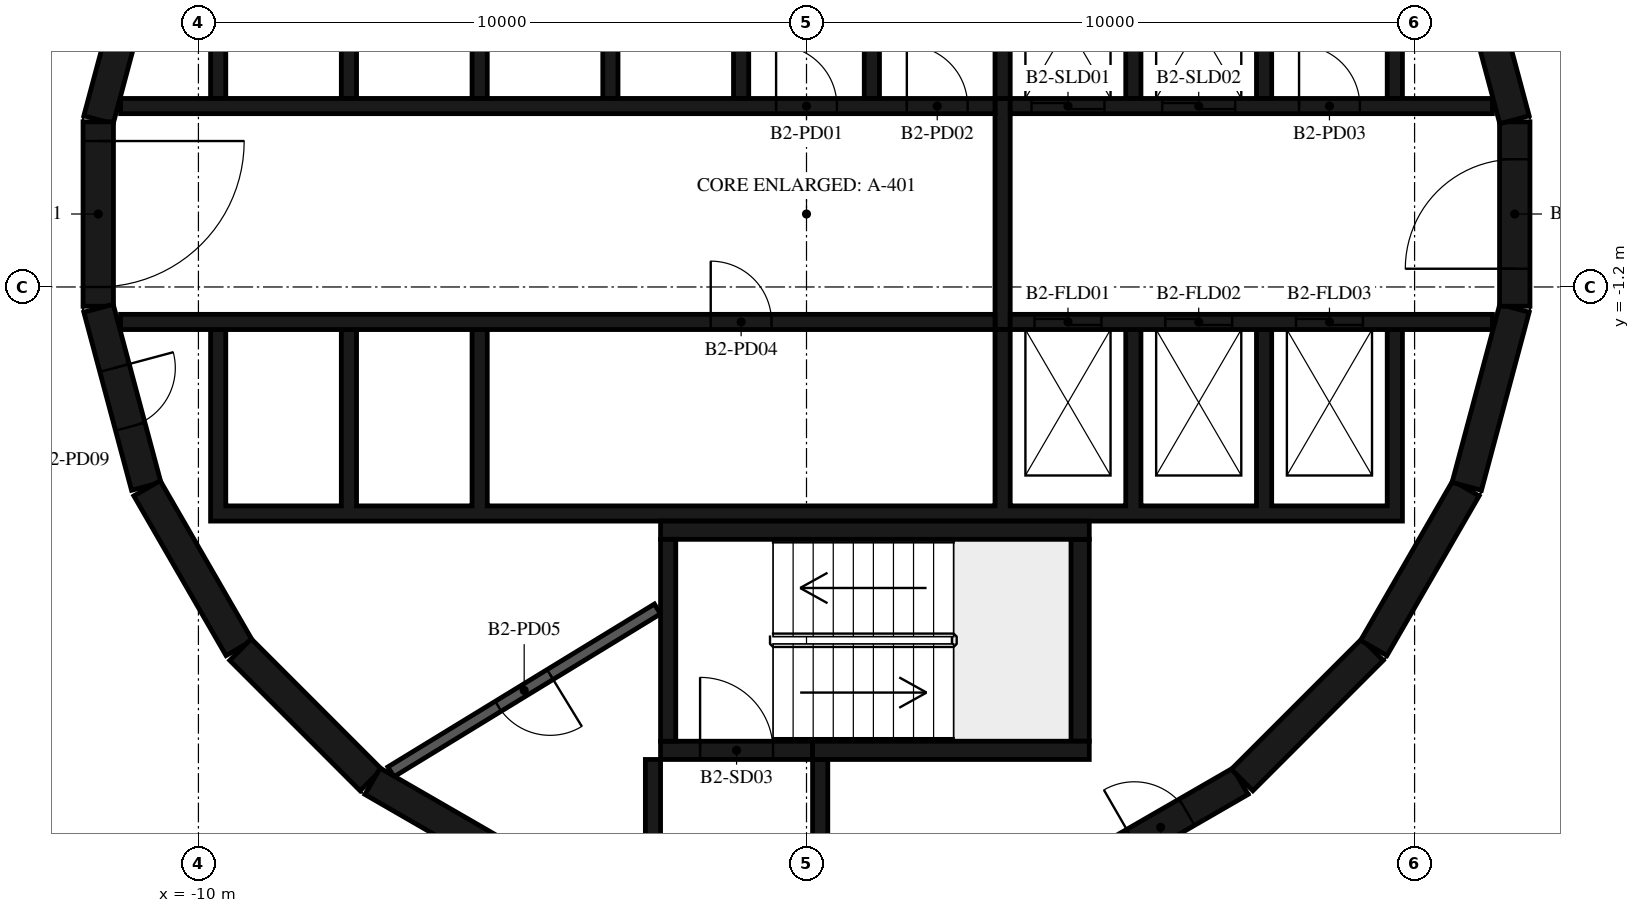
"""IFC4 building model, lengths in metres.
Left out: names, types, materials, properties, quantities, classifications, styles, units other than length and angle.
Written with IfcOpenShell. Run it as: python <this file> out.ifc"""

import sys

from ifc_helpers import new_model, si_unit, direction, frame, frame_2d, origin, place, context, subcontext, project, spatial, polyline, rectangle, outline, extrude, element, fill, save


model = new_model("IFC4")
c1 = context("Model", 3, precision=1e-05, world=origin(), true_north=direction((0.0, 1.0)))
c2 = subcontext(c1, "Body", "Model", "MODEL_VIEW")
j1 = project(units=[si_unit("LENGTHUNIT", "METRE"), si_unit("PLANEANGLEUNIT", "RADIAN")], contexts=[c1])
p1 = place(None, origin())
s1 = spatial("IfcSite", under=j1, at=p1, CompositionType="ELEMENT")
p2 = place(p1, origin())
s2 = spatial("IfcBuilding", under=s1, at=p2, CompositionType="ELEMENT")
p3 = place(p2, frame((0.0, 0.0, -8.4)))
s3 = spatial("IfcBuildingStorey", under=s2, at=p3, CompositionType="ELEMENT", Elevation=-8.4)
p4 = place(p3, frame((4.51, -10.845, 0.0), z_axis=(0.0, 0.0, 1.0), x_axis=(0.865975092491, 0.500087131594, 0.0)))
e1 = element("IfcWall", 1, at=p4, inside=s3, PredefinedType="SHEAR", context=c2, shape_type="SweptSolid", body=[
    extrude(rectangle(XDim=3.033, YDim=0.5, at=frame_2d((1.516, 0.0))), origin(), (0.0, 0.0, 1.0), 3.82),
])
p5 = place(p4, frame((1.016, 0.0, 0.0)))
e2 = element("IfcOpeningElement", 2, at=p5, cuts=e1, PredefinedType="OPENING", context=c2, shape_type="SweptSolid", body=[
    extrude(rectangle(XDim=1.0, YDim=2.4, at=frame_2d((0.5, 1.2))), frame((0.0, 0.26, 0.0), z_axis=(0.0, -1.0, 0.0), x_axis=(1.0, 0.0, 0.0)), (0.0, 0.0, 1.0), 0.52),
])
p6 = place(p3, frame((7.164, -9.308, 0.0), z_axis=(0.0, 0.0, 1.0), x_axis=(0.707106781187, 0.707106781187, 0.0)))
e3 = element("IfcWall", 3, at=p6, inside=s3, PredefinedType="SHEAR", context=c2, shape_type="SweptSolid", body=[
    extrude(rectangle(XDim=3.032, YDim=0.5, at=frame_2d((1.516, 0.0))), origin(), (0.0, 0.0, 1.0), 3.82),
])
for number, where, z_axis, x_axis in (
    (4, (9.329, -7.137, 0.0), (0.0, 0.0, 1.0), (0.5, 0.866, 0.0)),
    (5, (10.858, -4.479, 0.0), (0.0, 0.0, 1.0), (0.259, 0.966, 0.0)),
):
    element("IfcWall", number, at=place(p3, frame(where, z_axis=z_axis, x_axis=x_axis)), inside=s3, PredefinedType="SHEAR", context=c2, shape_type="SweptSolid", body=[
        extrude(rectangle(XDim=3.033, YDim=0.5, at=frame_2d((1.516, 0.0))), origin(), (0.0, 0.0, 1.0), 3.82),
    ])
p7 = place(p3, frame((11.647, -1.516, 0.0), z_axis=(0.0, 0.0, 1.0), x_axis=(0.0, 1.0, 0.0)))
e6 = element("IfcWall", 6, at=p7, inside=s3, PredefinedType="SHEAR", context=c2, shape_type="SweptSolid", body=[
    extrude(rectangle(XDim=3.033, YDim=0.5, at=frame_2d((1.516, 0.0))), origin(), (0.0, 0.0, 1.0), 3.82),
])
p8 = place(p7, frame((0.616, 0.0, 0.0)))
e7 = element("IfcOpeningElement", 7, at=p8, cuts=e6, PredefinedType="OPENING", context=c2, shape_type="SweptSolid", body=[
    extrude(rectangle(XDim=1.8, YDim=2.1, at=frame_2d((0.9, 1.05))), frame((0.0, 0.26, 0.0), z_axis=(0.0, -1.0, 0.0), x_axis=(1.0, 0.0, 0.0)), (0.0, 0.0, 1.0), 0.52),
])
for number, where, z_axis, x_axis in (
    (8, (11.643, 1.55, 0.0), (0.0, 0.0, 1.0), (-0.259, 0.966, 0.0)),
    (9, (-10.858, 4.479, 0.0), (0.0, 0.0, 1.0), (-0.259, -0.966, 0.0)),
):
    element("IfcWall", number, at=place(p3, frame(where, z_axis=z_axis, x_axis=x_axis)), inside=s3, PredefinedType="SHEAR", context=c2, shape_type="SweptSolid", body=[
        extrude(rectangle(XDim=3.033, YDim=0.5, at=frame_2d((1.516, 0.0))), origin(), (0.0, 0.0, 1.0), 3.82),
    ])
p9 = place(p3, frame((-11.647, 1.516, 0.0), z_axis=(0.0, 0.0, 1.0), x_axis=(0.0, -1.0, 0.0)))
e10 = element("IfcWall", 10, at=p9, inside=s3, PredefinedType="SHEAR", context=c2, shape_type="SweptSolid", body=[
    extrude(rectangle(XDim=3.033, YDim=0.5, at=frame_2d((1.516, 0.0))), origin(), (0.0, 0.0, 1.0), 3.82),
])
p10 = place(p9, frame((0.316, 0.0, 0.0)))
e11 = element("IfcOpeningElement", 11, at=p10, cuts=e10, PredefinedType="OPENING", context=c2, shape_type="SweptSolid", body=[
    extrude(rectangle(XDim=2.4, YDim=2.1, at=frame_2d((1.2, 1.05))), frame((0.0, 0.26, 0.0), z_axis=(0.0, -1.0, 0.0), x_axis=(1.0, 0.0, 0.0)), (0.0, 0.0, 1.0), 0.52),
])
p11 = place(p3, frame((-11.643, -1.55, 0.0), z_axis=(0.0, 0.0, 1.0), x_axis=(0.258734743916, -0.965948410781, 0.0)))
e12 = element("IfcWall", 12, at=p11, inside=s3, PredefinedType="SHEAR", context=c2, shape_type="SweptSolid", body=[
    extrude(rectangle(XDim=3.033, YDim=0.5, at=frame_2d((1.516, 0.0))), origin(), (0.0, 0.0, 1.0), 3.82),
])
p12 = place(p11, frame((1.016, 0.0, 0.0)))
e13 = element("IfcOpeningElement", 13, at=p12, cuts=e12, PredefinedType="OPENING", context=c2, shape_type="SweptSolid", body=[
    extrude(rectangle(XDim=1.0, YDim=2.4, at=frame_2d((0.5, 1.2))), frame((0.0, 0.26, 0.0), z_axis=(0.0, -1.0, 0.0), x_axis=(1.0, 0.0, 0.0)), (0.0, 0.0, 1.0), 0.52),
])
p13 = place(p3, frame((-10.845, -4.51, 0.0), z_axis=(0.0, 0.0, 1.0), x_axis=(0.500087131594, -0.865975092491, 0.0)))
e14 = element("IfcWall", 14, at=p13, inside=s3, PredefinedType="SHEAR", context=c2, shape_type="SweptSolid", body=[
    extrude(rectangle(XDim=3.033, YDim=0.5, at=frame_2d((1.516, 0.0))), origin(), (0.0, 0.0, 1.0), 3.82),
])
p14 = place(p3, frame((-9.308, -7.164, 0.0), z_axis=(0.0, 0.0, 1.0), x_axis=(0.707106781187, -0.707106781187, 0.0)))
e15 = element("IfcWall", 15, at=p14, inside=s3, PredefinedType="SHEAR", context=c2, shape_type="SweptSolid", body=[
    extrude(rectangle(XDim=3.032, YDim=0.5, at=frame_2d((1.516, 0.0))), origin(), (0.0, 0.0, 1.0), 3.82),
])
p15 = place(p3, frame((-7.137, -9.329, 0.0), z_axis=(0.0, 0.0, 1.0), x_axis=(0.865975092491, -0.500087131594, 0.0)))
e16 = element("IfcWall", 16, at=p15, inside=s3, PredefinedType="SHEAR", context=c2, shape_type="SweptSolid", body=[
    extrude(rectangle(XDim=3.033, YDim=0.5, at=frame_2d((1.516, 0.0))), origin(), (0.0, 0.0, 1.0), 3.82),
])
p16 = place(p3, frame((-2.275, -8.67, 0.0), z_axis=(0.0, 0.0, 1.0), x_axis=(0.0, 1.0, 0.0)))
e17 = element("IfcWall", 17, at=p16, inside=s3, PredefinedType="SHEAR", context=c2, shape_type="SweptSolid", body=[
    extrude(rectangle(XDim=3.32, YDim=0.25, at=frame_2d((1.66, 0.0))), origin(), (0.0, 0.0, 1.0), 3.82),
])
p17 = place(p3, frame((-2.4, -5.2, 0.0), z_axis=(0.0, 0.0, 1.0), x_axis=(1.0, 0.0, 0.0)))
e18 = element("IfcWall", 18, at=p17, inside=s3, PredefinedType="SHEAR", context=c2, shape_type="SweptSolid", body=[
    extrude(rectangle(XDim=7.05, YDim=0.3, at=frame_2d((3.525, 0.0))), origin(), (0.0, 0.0, 1.0), 3.82),
])
p18 = place(p3, frame((4.5, -8.67, 0.0), z_axis=(0.0, 0.0, 1.0), x_axis=(0.0, 1.0, 0.0)))
e19 = element("IfcWall", 19, at=p18, inside=s3, PredefinedType="SHEAR", context=c2, shape_type="SweptSolid", body=[
    extrude(rectangle(XDim=3.32, YDim=0.3, at=frame_2d((1.66, 0.0))), origin(), (0.0, 0.0, 1.0), 3.82),
])
p19 = place(p3, frame((0.1, -8.82, 0.0), z_axis=(0.0, 0.0, 1.0), x_axis=(1.0, 0.0, 0.0)))
e20 = element("IfcWall", 20, at=p19, inside=s3, PredefinedType="SHEAR", context=c2, shape_type="SweptSolid", body=[
    extrude(rectangle(XDim=4.55, YDim=0.3, at=frame_2d((2.275, 0.0))), origin(), (0.0, 0.0, 1.0), 3.82),
])
p20 = place(p3, frame((-2.4, -8.82, 0.0), z_axis=(0.0, 0.0, 1.0), x_axis=(1.0, 0.0, 0.0)))
e21 = element("IfcWall", 21, at=p20, inside=s3, PredefinedType="SHEAR", context=c2, shape_type="SweptSolid", body=[
    extrude(rectangle(XDim=2.5, YDim=0.3, at=frame_2d((1.25, 0.0))), origin(), (0.0, 0.0, 1.0), 3.82),
])
p21 = place(p20, frame((0.65, 0.0, 0.0)))
e22 = element("IfcOpeningElement", 22, at=p21, cuts=e21, PredefinedType="OPENING", context=c2, shape_type="SweptSolid", body=[
    extrude(rectangle(XDim=1.2, YDim=2.1, at=frame_2d((0.6, 1.05))), frame((0.0, 0.16, 0.0), z_axis=(0.0, -1.0, 0.0), x_axis=(1.0, 0.0, 0.0)), (0.0, 0.0, 1.0), 0.32),
])
p22 = place(p3, frame((-2.525, -8.97, 0.0), z_axis=(0.0, 0.0, 1.0), x_axis=(0.0, -1.0, 0.0)))
e23 = element("IfcWall", 23, at=p22, inside=s3, PredefinedType="SHEAR", context=c2, shape_type="SweptSolid", body=[
    extrude(rectangle(XDim=2.11, YDim=0.25, at=frame_2d((1.055, 0.0))), origin(), (0.0, 0.0, 1.0), 3.82),
])
p23 = place(p3, frame((0.225, -8.97, 0.0), z_axis=(0.0, 0.0, 1.0), x_axis=(0.0, -1.0, 0.0)))
e24 = element("IfcWall", 24, at=p23, inside=s3, PredefinedType="SHEAR", context=c2, shape_type="SweptSolid", body=[
    extrude(rectangle(XDim=2.41, YDim=0.25, at=frame_2d((1.205, 0.0))), origin(), (0.0, 0.0, 1.0), 3.82),
])
p24 = place(p3, origin())
e25 = element("IfcWall", 25, at=p24, inside=s3, PredefinedType="SHEAR", context=c2, shape_type="SweptSolid", body=[
    extrude(outline(polyline([(-9.55, 4.8), (-7.65, 4.8), (-7.65, 1.9), (-7.4, 1.9), (-7.4, 4.8), (-5.5, 4.8), (-5.5, 1.9), (-5.25, 1.9), (-5.25, 4.8), (-3.35, 4.8), (-3.35, 1.9), (-3.1, 1.9), (-3.1, 4.8), (-1.2, 4.8), (-1.2, 1.9), (-0.95, 1.9), (-0.95, 4.8), (0.95, 4.8), (0.95, 1.9), (1.2, 1.9), (1.2, 4.8), (3.1, 4.8), (3.1, 1.9), (3.35, 1.9), (3.35, 4.8), (5.25, 4.8), (5.25, 1.9), (5.5, 1.9), (5.5, 4.8), (7.4, 4.8), (7.4, 1.9), (7.65, 1.9), (7.65, 4.8), (9.55, 4.8), (9.55, 1.9), (9.8, 1.9), (9.8, 4.8), (9.8, 5.05), (-9.8, 5.05), (-9.8, 4.8), (-9.8, 1.9), (-9.55, 1.9), (-9.55, 4.8)])), origin(), (0.0, 0.0, 1.0), 3.82),
])
p25 = place(p3, origin())
e26 = element("IfcWall", 26, at=p25, inside=s3, PredefinedType="SHEAR", context=c2, shape_type="SweptSolid", body=[
    extrude(outline(polyline([(9.8, -5.05), (9.8, -4.8), (9.8, -1.9), (9.55, -1.9), (9.55, -4.8), (7.65, -4.8), (7.65, -1.9), (7.4, -1.9), (7.4, -4.8), (5.5, -4.8), (5.5, -1.9), (5.25, -1.9), (5.25, -4.8), (3.35, -4.8), (3.35, -1.9), (3.1, -1.9), (3.1, -4.8), (-5.25, -4.8), (-5.25, -1.9), (-5.5, -1.9), (-5.5, -4.8), (-7.4, -4.8), (-7.4, -1.9), (-7.65, -1.9), (-7.65, -4.8), (-9.55, -4.8), (-9.55, -1.9), (-9.8, -1.9), (-9.8, -4.8), (-9.8, -5.05), (9.8, -5.05)])), origin(), (0.0, 0.0, 1.0), 3.82),
])
p26 = place(p3, frame((-11.28, 1.775, 0.0), z_axis=(0.0, 0.0, 1.0), x_axis=(1.0, 0.0, 0.0)))
e27 = element("IfcWall", 27, at=p26, inside=s3, PredefinedType="SHEAR", context=c2, shape_type="SweptSolid", body=[
    extrude(rectangle(XDim=14.38, YDim=0.25, at=frame_2d((7.19, 0.0))), origin(), (0.0, 0.0, 1.0), 3.82),
])
p27 = place(p26, frame((10.78, 0.0, 0.0)))
e28 = element("IfcOpeningElement", 28, at=p27, cuts=e27, PredefinedType="OPENING", context=c2, shape_type="SweptSolid", body=[
    extrude(rectangle(XDim=1.0, YDim=2.4, at=frame_2d((0.5, 1.2))), frame((0.0, 0.135, 0.0), z_axis=(0.0, -1.0, 0.0), x_axis=(1.0, 0.0, 0.0)), (0.0, 0.0, 1.0), 0.27),
])
p28 = place(p26, frame((12.93, 0.0, 0.0)))
e29 = element("IfcOpeningElement", 29, at=p28, cuts=e27, PredefinedType="OPENING", context=c2, shape_type="SweptSolid", body=[
    extrude(rectangle(XDim=1.0, YDim=2.4, at=frame_2d((0.5, 1.2))), frame((0.0, 0.135, 0.0), z_axis=(0.0, -1.0, 0.0), x_axis=(1.0, 0.0, 0.0)), (0.0, 0.0, 1.0), 0.27),
])
p29 = place(p3, frame((3.35, 1.775, 0.0), z_axis=(0.0, 0.0, 1.0), x_axis=(1.0, 0.0, 0.0)))
e30 = element("IfcWall", 30, at=p29, inside=s3, PredefinedType="SHEAR", context=c2, shape_type="SweptSolid", body=[
    extrude(rectangle(XDim=7.93, YDim=0.25, at=frame_2d((3.965, 0.0))), origin(), (0.0, 0.0, 1.0), 3.82),
])
p30 = place(p29, frame((0.35, 0.0, 0.0)))
e31 = element("IfcOpeningElement", 31, at=p30, cuts=e30, PredefinedType="OPENING", context=c2, shape_type="SweptSolid", body=[
    extrude(rectangle(XDim=1.2, YDim=2.4, at=frame_2d((0.6, 1.2))), frame((0.0, 0.135, 0.0), z_axis=(0.0, -1.0, 0.0), x_axis=(1.0, 0.0, 0.0)), (0.0, 0.0, 1.0), 0.27),
])
p31 = place(p29, frame((2.5, 0.0, 0.0)))
e32 = element("IfcOpeningElement", 32, at=p31, cuts=e30, PredefinedType="OPENING", context=c2, shape_type="SweptSolid", body=[
    extrude(rectangle(XDim=1.2, YDim=2.4, at=frame_2d((0.6, 1.2))), frame((0.0, 0.135, 0.0), z_axis=(0.0, -1.0, 0.0), x_axis=(1.0, 0.0, 0.0)), (0.0, 0.0, 1.0), 0.27),
])
p32 = place(p29, frame((4.75, 0.0, 0.0)))
e33 = element("IfcOpeningElement", 33, at=p32, cuts=e30, PredefinedType="OPENING", context=c2, shape_type="SweptSolid", body=[
    extrude(rectangle(XDim=1.0, YDim=2.4, at=frame_2d((0.5, 1.2))), frame((0.0, 0.135, 0.0), z_axis=(0.0, -1.0, 0.0), x_axis=(1.0, 0.0, 0.0)), (0.0, 0.0, 1.0), 0.27),
])
p33 = place(p3, frame((-11.28, -1.775, 0.0), z_axis=(0.0, 0.0, 1.0), x_axis=(1.0, 0.0, 0.0)))
e34 = element("IfcWall", 34, at=p33, inside=s3, PredefinedType="SHEAR", context=c2, shape_type="SweptSolid", body=[
    extrude(rectangle(XDim=14.38, YDim=0.25, at=frame_2d((7.19, 0.0))), origin(), (0.0, 0.0, 1.0), 3.82),
])
p34 = place(p33, frame((9.705, 0.0, 0.0)))
e35 = element("IfcOpeningElement", 35, at=p34, cuts=e34, PredefinedType="OPENING", context=c2, shape_type="SweptSolid", body=[
    extrude(rectangle(XDim=1.0, YDim=2.4, at=frame_2d((0.5, 1.2))), frame((0.0, 0.135, 0.0), z_axis=(0.0, -1.0, 0.0), x_axis=(1.0, 0.0, 0.0)), (0.0, 0.0, 1.0), 0.27),
])
p35 = place(p3, frame((3.35, -1.775, 0.0), z_axis=(0.0, 0.0, 1.0), x_axis=(1.0, 0.0, 0.0)))
e36 = element("IfcWall", 36, at=p35, inside=s3, PredefinedType="SHEAR", context=c2, shape_type="SweptSolid", body=[
    extrude(rectangle(XDim=7.93, YDim=0.25, at=frame_2d((3.965, 0.0))), origin(), (0.0, 0.0, 1.0), 3.82),
])
p36 = place(p35, frame((0.4, 0.0, 0.0)))
e37 = element("IfcOpeningElement", 37, at=p36, cuts=e36, PredefinedType="OPENING", context=c2, shape_type="SweptSolid", body=[
    extrude(rectangle(XDim=1.1, YDim=2.4, at=frame_2d((0.55, 1.2))), frame((0.0, 0.135, 0.0), z_axis=(0.0, -1.0, 0.0), x_axis=(1.0, 0.0, 0.0)), (0.0, 0.0, 1.0), 0.27),
])
p37 = place(p35, frame((2.55, 0.0, 0.0)))
e38 = element("IfcOpeningElement", 38, at=p37, cuts=e36, PredefinedType="OPENING", context=c2, shape_type="SweptSolid", body=[
    extrude(rectangle(XDim=1.1, YDim=2.4, at=frame_2d((0.55, 1.2))), frame((0.0, 0.135, 0.0), z_axis=(0.0, -1.0, 0.0), x_axis=(1.0, 0.0, 0.0)), (0.0, 0.0, 1.0), 0.27),
])
p38 = place(p35, frame((4.7, 0.0, 0.0)))
e39 = element("IfcOpeningElement", 39, at=p38, cuts=e36, PredefinedType="OPENING", context=c2, shape_type="SweptSolid", body=[
    extrude(rectangle(XDim=1.1, YDim=2.4, at=frame_2d((0.55, 1.2))), frame((0.0, 0.135, 0.0), z_axis=(0.0, -1.0, 0.0), x_axis=(1.0, 0.0, 0.0)), (0.0, 0.0, 1.0), 0.27),
])
p39 = place(p3, frame((3.225, -1.9, 0.0), z_axis=(0.0, 0.0, 1.0), x_axis=(0.0, 1.0, 0.0)))
e40 = element("IfcWall", 40, at=p39, inside=s3, PredefinedType="SHEAR", context=c2, shape_type="SweptSolid", body=[
    extrude(rectangle(XDim=3.8, YDim=0.25, at=frame_2d((1.9, 0.0))), origin(), (0.0, 0.0, 1.0), 3.82),
])
p40 = place(p3, frame((-2.451, -6.495, 0.0), z_axis=(0.0, 0.0, 1.0), x_axis=(-0.853250115418, -0.521501908471, 0.0)))
e41 = element("IfcWall", 41, at=p40, inside=s3, PredefinedType="PARTITIONING", context=c2, shape_type="SweptSolid", body=[
    extrude(rectangle(XDim=5.137, YDim=0.19, at=frame_2d((2.569, 0.0))), origin(), (0.0, 0.0, 1.0), 3.82),
])
p41 = place(p40, frame((2.069, 0.0, 0.0)))
e42 = element("IfcOpeningElement", 42, at=p41, cuts=e41, PredefinedType="OPENING", context=c2, shape_type="SweptSolid", body=[
    extrude(rectangle(XDim=1.0, YDim=2.4, at=frame_2d((0.5, 1.2))), frame((0.0, 0.105, 0.0), z_axis=(0.0, -1.0, 0.0), x_axis=(1.0, 0.0, 0.0)), (0.0, 0.0, 1.0), 0.21),
])
p42 = place(p21, origin())
e43 = element("IfcDoor", 43, at=p42, inside=s3, OperationType="SINGLE_SWING_LEFT", PredefinedType="DOOR", context=c2, shape_type="SweptSolid", body=[
    extrude(rectangle(XDim=1.2, YDim=2.1, at=frame_2d((0.6, 1.05))), frame((0.0, 0.025, 0.0), z_axis=(0.0, -1.0, 0.0), x_axis=(1.0, 0.0, 0.0)), (0.0, 0.0, 1.0), 0.05),
])
fill(e22, e43)
p43 = place(p10, origin())
e44 = element("IfcDoor", 44, at=p43, inside=s3, OperationType="DOUBLE_DOOR_SINGLE_SWING", PredefinedType="DOOR", context=c2, shape_type="SweptSolid", body=[
    extrude(rectangle(XDim=2.4, YDim=2.1, at=frame_2d((1.2, 1.05))), frame((0.0, 0.025, 0.0), z_axis=(0.0, -1.0, 0.0), x_axis=(1.0, 0.0, 0.0)), (0.0, 0.0, 1.0), 0.05),
])
fill(e11, e44)
p44 = place(p8, origin())
e45 = element("IfcDoor", 45, at=p44, inside=s3, OperationType="DOUBLE_DOOR_SINGLE_SWING", PredefinedType="DOOR", context=c2, shape_type="SweptSolid", body=[
    extrude(rectangle(XDim=1.8, YDim=2.1, at=frame_2d((0.9, 1.05))), frame((0.0, 0.025, 0.0), z_axis=(0.0, -1.0, 0.0), x_axis=(1.0, 0.0, 0.0)), (0.0, 0.0, 1.0), 0.05),
])
fill(e7, e45)
p45 = place(p30, origin())
e46 = element("IfcDoor", 46, at=p45, inside=s3, OperationType="DOUBLE_DOOR_SLIDING", PredefinedType="DOOR", context=c2, shape_type="SweptSolid", body=[
    extrude(rectangle(XDim=1.2, YDim=2.4, at=frame_2d((0.6, 1.2))), frame((0.0, 0.025, 0.0), z_axis=(0.0, -1.0, 0.0), x_axis=(1.0, 0.0, 0.0)), (0.0, 0.0, 1.0), 0.05),
])
fill(e31, e46)
p46 = place(p31, origin())
e47 = element("IfcDoor", 47, at=p46, inside=s3, OperationType="DOUBLE_DOOR_SLIDING", PredefinedType="DOOR", context=c2, shape_type="SweptSolid", body=[
    extrude(rectangle(XDim=1.2, YDim=2.4, at=frame_2d((0.6, 1.2))), frame((0.0, 0.025, 0.0), z_axis=(0.0, -1.0, 0.0), x_axis=(1.0, 0.0, 0.0)), (0.0, 0.0, 1.0), 0.05),
])
fill(e32, e47)
p47 = place(p36, origin())
e48 = element("IfcDoor", 48, at=p47, inside=s3, OperationType="DOUBLE_DOOR_SLIDING", PredefinedType="DOOR", context=c2, shape_type="SweptSolid", body=[
    extrude(rectangle(XDim=1.1, YDim=2.4, at=frame_2d((0.55, 1.2))), frame((0.0, 0.025, 0.0), z_axis=(0.0, -1.0, 0.0), x_axis=(1.0, 0.0, 0.0)), (0.0, 0.0, 1.0), 0.05),
])
fill(e37, e48)
p48 = place(p37, origin())
e49 = element("IfcDoor", 49, at=p48, inside=s3, OperationType="DOUBLE_DOOR_SLIDING", PredefinedType="DOOR", context=c2, shape_type="SweptSolid", body=[
    extrude(rectangle(XDim=1.1, YDim=2.4, at=frame_2d((0.55, 1.2))), frame((0.0, 0.025, 0.0), z_axis=(0.0, -1.0, 0.0), x_axis=(1.0, 0.0, 0.0)), (0.0, 0.0, 1.0), 0.05),
])
fill(e38, e49)
p49 = place(p38, origin())
e50 = element("IfcDoor", 50, at=p49, inside=s3, OperationType="DOUBLE_DOOR_SLIDING", PredefinedType="DOOR", context=c2, shape_type="SweptSolid", body=[
    extrude(rectangle(XDim=1.1, YDim=2.4, at=frame_2d((0.55, 1.2))), frame((0.0, 0.025, 0.0), z_axis=(0.0, -1.0, 0.0), x_axis=(1.0, 0.0, 0.0)), (0.0, 0.0, 1.0), 0.05),
])
fill(e39, e50)
p50 = place(p27, origin())
e51 = element("IfcDoor", 51, at=p50, inside=s3, OperationType="SINGLE_SWING_RIGHT", PredefinedType="DOOR", context=c2, shape_type="SweptSolid", body=[
    extrude(rectangle(XDim=1.0, YDim=2.4, at=frame_2d((0.5, 1.2))), frame((0.0, 0.025, 0.0), z_axis=(0.0, -1.0, 0.0), x_axis=(1.0, 0.0, 0.0)), (0.0, 0.0, 1.0), 0.05),
])
fill(e28, e51)
p51 = place(p28, origin())
e52 = element("IfcDoor", 52, at=p51, inside=s3, OperationType="SINGLE_SWING_LEFT", PredefinedType="DOOR", context=c2, shape_type="SweptSolid", body=[
    extrude(rectangle(XDim=1.0, YDim=2.4, at=frame_2d((0.5, 1.2))), frame((0.0, 0.025, 0.0), z_axis=(0.0, -1.0, 0.0), x_axis=(1.0, 0.0, 0.0)), (0.0, 0.0, 1.0), 0.05),
])
fill(e29, e52)
p52 = place(p32, origin())
e53 = element("IfcDoor", 53, at=p52, inside=s3, OperationType="SINGLE_SWING_RIGHT", PredefinedType="DOOR", context=c2, shape_type="SweptSolid", body=[
    extrude(rectangle(XDim=1.0, YDim=2.4, at=frame_2d((0.5, 1.2))), frame((0.0, 0.025, 0.0), z_axis=(0.0, -1.0, 0.0), x_axis=(1.0, 0.0, 0.0)), (0.0, 0.0, 1.0), 0.05),
])
fill(e33, e53)
p53 = place(p34, origin())
e54 = element("IfcDoor", 54, at=p53, inside=s3, OperationType="SINGLE_SWING_LEFT", PredefinedType="DOOR", context=c2, shape_type="SweptSolid", body=[
    extrude(rectangle(XDim=1.0, YDim=2.4, at=frame_2d((0.5, 1.2))), frame((0.0, 0.025, 0.0), z_axis=(0.0, -1.0, 0.0), x_axis=(1.0, 0.0, 0.0)), (0.0, 0.0, 1.0), 0.05),
])
fill(e35, e54)
p54 = place(p41, origin())
e55 = element("IfcDoor", 55, at=p54, inside=s3, OperationType="SINGLE_SWING_RIGHT", PredefinedType="DOOR", context=c2, shape_type="SweptSolid", body=[
    extrude(rectangle(XDim=1.0, YDim=2.4, at=frame_2d((0.5, 1.2))), frame((0.0, 0.025, 0.0), z_axis=(0.0, -1.0, 0.0), x_axis=(1.0, 0.0, 0.0)), (0.0, 0.0, 1.0), 0.05),
])
fill(e42, e55)
p55 = place(p5, origin())
e56 = element("IfcDoor", 56, at=p55, inside=s3, OperationType="SINGLE_SWING_LEFT", PredefinedType="DOOR", context=c2, shape_type="SweptSolid", body=[
    extrude(rectangle(XDim=1.0, YDim=2.4, at=frame_2d((0.5, 1.2))), frame((0.0, 0.025, 0.0), z_axis=(0.0, -1.0, 0.0), x_axis=(1.0, 0.0, 0.0)), (0.0, 0.0, 1.0), 0.05),
])
fill(e2, e56)
p56 = place(p12, origin())
e57 = element("IfcDoor", 57, at=p56, inside=s3, OperationType="SINGLE_SWING_RIGHT", PredefinedType="DOOR", context=c2, shape_type="SweptSolid", body=[
    extrude(rectangle(XDim=1.0, YDim=2.4, at=frame_2d((0.5, 1.2))), frame((0.0, 0.025, 0.0), z_axis=(0.0, -1.0, 0.0), x_axis=(1.0, 0.0, 0.0)), (0.0, 0.0, 1.0), 0.05),
])
fill(e13, e57)
save(model, sys.argv[1])
